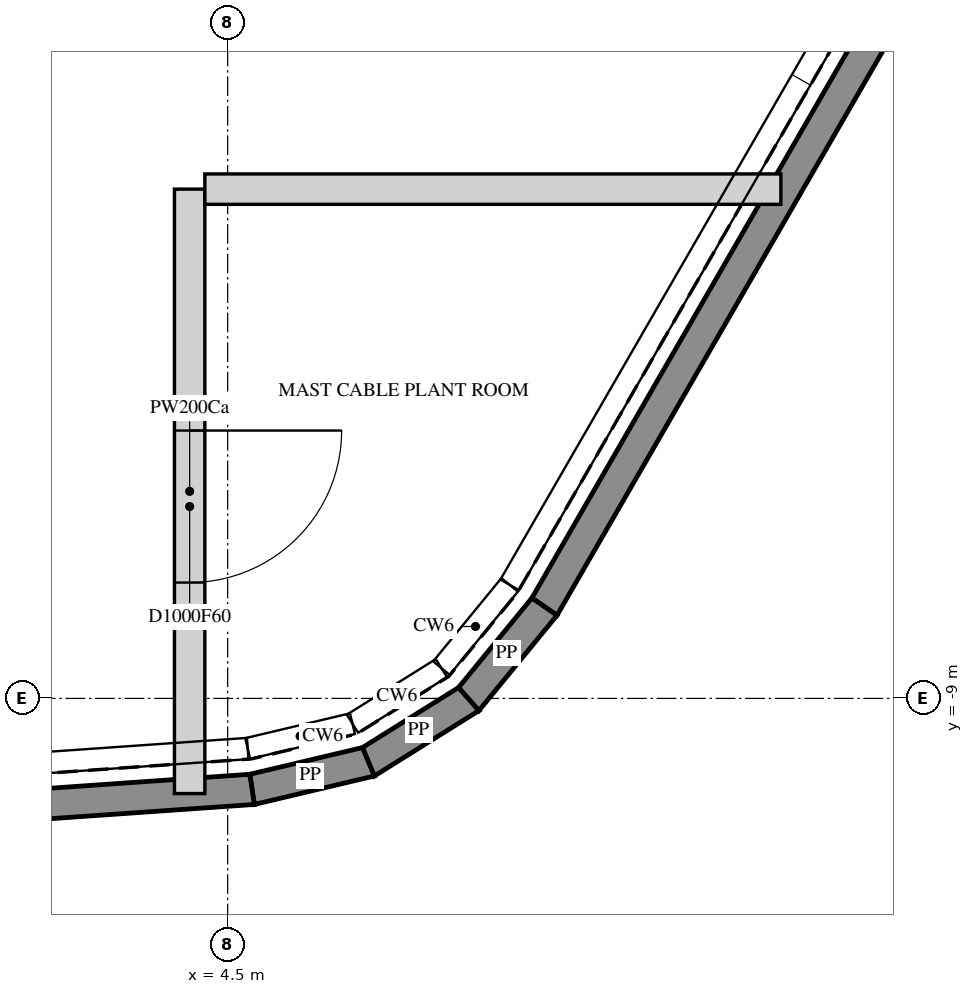
"""IFC4 building model, lengths in metres.
Left out: names, types, materials, properties, quantities, classifications, styles, units other than length and angle.
Written with IfcOpenShell. Run it as: python <this file> out.ifc"""

import sys

from ifc_helpers import new_model, si_unit, direction, frame, frame_2d, origin, place, context, subcontext, project, spatial, polyline, rectangle, outline, extrude, element, fill, save


model = new_model("IFC4")
c1 = context("Model", 3, precision=1e-05, world=origin(), true_north=direction((0.0, 1.0)))
c2 = subcontext(c1, "Body", "Model", "MODEL_VIEW")
j1 = project(units=[si_unit("LENGTHUNIT", "METRE"), si_unit("PLANEANGLEUNIT", "RADIAN")], contexts=[c1])
p1 = place(None, origin())
s1 = spatial("IfcSite", under=j1, at=p1, CompositionType="ELEMENT")
p2 = place(p1, origin())
s2 = spatial("IfcBuilding", under=s1, at=p2, CompositionType="ELEMENT")
p3 = place(p2, frame((0.0, 0.0, 406.2)))
s3 = spatial("IfcBuildingStorey", under=s2, at=p3, CompositionType="ELEMENT", Elevation=406.2)
p4 = place(p3, frame((10.912, -0.899, 4.5), z_axis=(0.0, 0.0, 1.0), x_axis=(-0.500015396624, -0.866016514357, 0.0)))
e1 = element("IfcWall", 1, at=p4, inside=s3, PredefinedType="PARAPET", context=c2, shape_type="SweptSolid", body=[
    extrude(outline(polyline([(0.009, -0.1), (8.649, -0.1), (8.665, 0.1), (-0.009, 0.1), (0.009, -0.1)])), origin(), (0.0, 0.0, 1.0), 1.1),
])
p5 = place(p3, frame((6.584, -8.396, 4.5), z_axis=(0.0, 0.0, 1.0), x_axis=(-0.63377874599, -0.773514383274, 0.0)))
e2 = element("IfcWall", 2, at=p5, inside=s3, PredefinedType="PARAPET", context=c2, shape_type="SweptSolid", body=[
    extrude(outline(polyline([(0.008, -0.1), (0.77, -0.1), (0.802, 0.1), (-0.008, 0.1), (0.008, -0.1)])), origin(), (0.0, 0.0, 1.0), 1.1),
])
p6 = place(p3, frame((6.085, -9.005, 4.5), z_axis=(0.0, 0.0, 1.0), x_axis=(-0.848051178058, -0.529914332127, 0.0)))
e3 = element("IfcWall", 3, at=p6, inside=s3, PredefinedType="PARAPET", context=c2, shape_type="SweptSolid", body=[
    extrude(outline(polyline([(0.016, -0.1), (0.762, -0.1), (0.794, 0.1), (-0.016, 0.1), (0.016, -0.1)])), origin(), (0.0, 0.0, 1.0), 1.1),
])
p7 = place(p3, frame((5.426, -9.417, 4.5), z_axis=(0.0, 0.0, 1.0), x_axis=(-0.973012429329, -0.230752708264, 0.0)))
e4 = element("IfcWall", 4, at=p7, inside=s3, PredefinedType="PARAPET", context=c2, shape_type="SweptSolid", body=[
    extrude(outline(polyline([(0.016, -0.1), (0.778, -0.1), (0.794, 0.1), (-0.016, 0.1), (0.016, -0.1)])), origin(), (0.0, 0.0, 1.0), 1.1),
])
p8 = place(p3, frame((4.661, -9.598, 4.5), z_axis=(0.0, 0.0, 1.0), x_axis=(-0.997564935638, -0.069743811089, 0.0)))
e5 = element("IfcWall", 5, at=p8, inside=s3, PredefinedType="PARAPET", context=c2, shape_type="SweptSolid", body=[
    extrude(outline(polyline([(0.008, -0.1), (8.647, -0.1), (8.666, 0.1), (-0.008, 0.1), (0.008, -0.1)])), origin(), (0.0, 0.0, 1.0), 1.1),
])
p9 = place(p3, frame((4.25, -5.65, 0.0), z_axis=(0.0, 0.0, 1.0), x_axis=(0.0, -1.0, 0.0)))
e6 = element("IfcWall", 6, at=p9, inside=s3, PredefinedType="PARTITIONING", context=c2, shape_type="SweptSolid", body=[
    extrude(rectangle(XDim=3.976, YDim=0.2, at=frame_2d((1.988, 0.0))), origin(), (0.0, 0.0, 1.0), 4.3),
])
p10 = place(p9, frame((1.588, 0.0, 0.0)))
e7 = element("IfcOpeningElement", 7, at=p10, cuts=e6, PredefinedType="OPENING", context=c2, shape_type="SweptSolid", body=[
    extrude(rectangle(XDim=1.0, YDim=2.1, at=frame_2d((0.5, 1.05))), frame((0.0, 0.11, 0.0), z_axis=(0.0, -1.0, 0.0), x_axis=(1.0, 0.0, 0.0)), (0.0, 0.0, 1.0), 0.22),
])
p11 = place(p3, frame((4.35, -5.65, 0.0), z_axis=(0.0, 0.0, 1.0), x_axis=(1.0, 0.0, 0.0)))
e8 = element("IfcWall", 8, at=p11, inside=s3, PredefinedType="PARTITIONING", context=c2, shape_type="SweptSolid", body=[
    extrude(rectangle(XDim=3.789, YDim=0.2, at=frame_2d((1.895, 0.0))), origin(), (0.0, 0.0, 1.0), 4.3),
])
p12 = place(p10, origin())
e9 = element("IfcDoor", 9, at=p12, inside=s3, OperationType="SINGLE_SWING_RIGHT", PredefinedType="DOOR", context=c2, shape_type="SweptSolid", body=[
    extrude(rectangle(XDim=1.0, YDim=2.1, at=frame_2d((0.5, 1.05))), frame((0.0, 0.025, 0.0), z_axis=(0.0, -1.0, 0.0), x_axis=(1.0, 0.0, 0.0)), (0.0, 0.0, 1.0), 0.05),
])
fill(e7, e9)
save(model, sys.argv[1])
